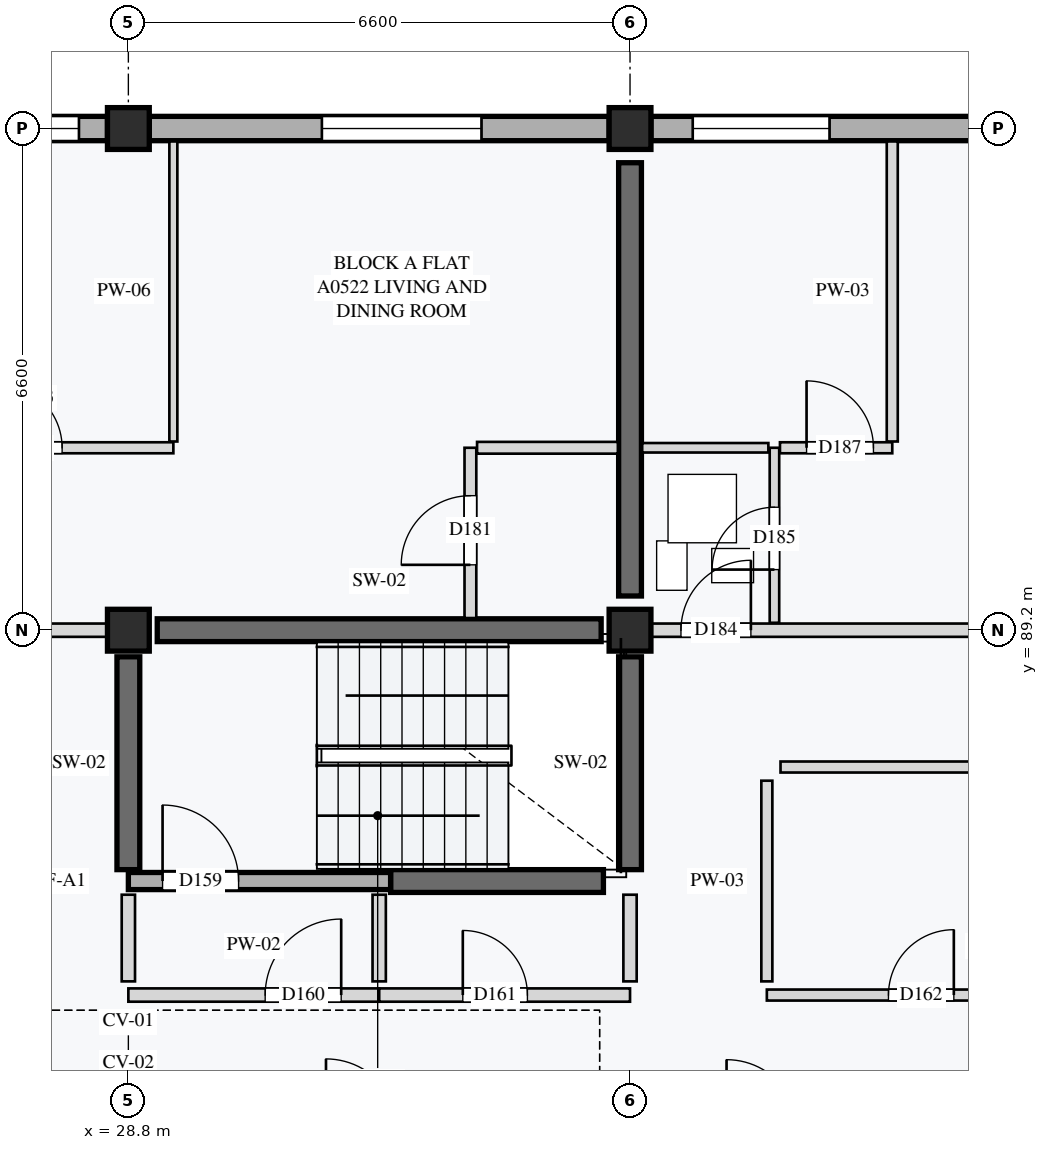
"""IFC4 building model, lengths in metres.
Left out: names, types, materials, properties, quantities, classifications, styles, units other than length and angle.
Written with IfcOpenShell. Run it as: python <this file> out.ifc"""

import sys

from ifc_helpers import new_model, si_unit, direction, frame, frame_2d, origin, origin_2d, place, context, subcontext, project, spatial, rectangle, extrude, element, fill, save


model = new_model("IFC4")
c1 = context("Model", 3, precision=1e-05, world=origin(), true_north=direction((0.0, 1.0)))
c2 = subcontext(c1, "Body", "Model", "MODEL_VIEW")
j1 = project(units=[si_unit("LENGTHUNIT", "METRE"), si_unit("PLANEANGLEUNIT", "RADIAN")], contexts=[c1])
p1 = place(None, origin())
s1 = spatial("IfcSite", under=j1, at=p1, CompositionType="ELEMENT")
p2 = place(p1, origin())
s2 = spatial("IfcBuilding", under=s1, at=p2, CompositionType="ELEMENT")
p3 = place(p2, frame((0.0, 0.0, 18.0)))
s3 = spatial("IfcBuildingStorey", under=s2, at=p3, CompositionType="ELEMENT", Elevation=18.0)
for number, where, z_axis, x_axis in (
    (1, (28.8, 89.2, 0.0), (0.0, 0.0, 1.0), (1.0, 0.0, 0.0)),
    (2, (28.8, 95.8, 0.0), (0.0, 0.0, 1.0), (1.0, 0.0, 0.0)),
    (3, (35.4, 89.2, 0.0), (0.0, 0.0, 1.0), (1.0, 0.0, 0.0)),
    (4, (35.4, 95.8, 0.0), (0.0, 0.0, 1.0), (1.0, 0.0, 0.0)),
):
    element("IfcColumn", number, at=place(p3, frame(where, z_axis=z_axis, x_axis=x_axis)), inside=s3, PredefinedType="COLUMN", context=c2, shape_type="SweptSolid", body=[
        extrude(rectangle(XDim=0.55, YDim=0.55, at=origin_2d()), origin(), (0.0, 0.0, 1.0), 3.2),
    ])
p4 = place(p3, frame((29.18, 89.2, 0.0), z_axis=(0.0, 0.0, 1.0), x_axis=(1.0, 0.0, 0.0)))
e5 = element("IfcWall", 5, at=p4, inside=s3, PredefinedType="SHEAR", context=c2, shape_type="SweptSolid", body=[
    extrude(rectangle(XDim=5.84, YDim=0.3, at=frame_2d((2.92, 0.0))), origin(), (0.0, 0.0, 1.0), 2.96),
])
for number, where, z_axis, x_axis in (
    (6, (32.25, 85.9, 0.0), (0.0, 0.0, 1.0), (1.0, 0.0, 0.0)),
    (7, (28.8, 86.05, 0.0), (0.0, 0.0, 1.0), (0.0, 1.0, 0.0)),
    (8, (35.4, 86.05, 0.0), (0.0, 0.0, 1.0), (0.0, 1.0, 0.0)),
):
    element("IfcWall", number, at=place(p3, frame(where, z_axis=z_axis, x_axis=x_axis)), inside=s3, PredefinedType="SHEAR", context=c2, shape_type="SweptSolid", body=[
        extrude(rectangle(XDim=2.8, YDim=0.3, at=frame_2d((1.4, 0.0))), origin(), (0.0, 0.0, 1.0), 2.96),
    ])
p5 = place(p3, frame((35.4, 89.65, 0.0), z_axis=(0.0, 0.0, 1.0), x_axis=(0.0, 1.0, 0.0)))
e9 = element("IfcWall", 9, at=p5, inside=s3, PredefinedType="SHEAR", context=c2, shape_type="SweptSolid", body=[
    extrude(rectangle(XDim=5.7, YDim=0.3, at=frame_2d((2.85, 0.0))), origin(), (0.0, 0.0, 1.0), 2.96),
])
p6 = place(p3, frame((22.475, 95.8, 0.0), z_axis=(0.0, 0.0, 1.0), x_axis=(1.0, 0.0, 0.0)))
e10 = element("IfcWall", 10, at=p6, inside=s3, PredefinedType="STANDARD", context=c2, shape_type="SweptSolid", body=[
    extrude(rectangle(XDim=6.05, YDim=0.32, at=frame_2d((3.025, 0.0))), origin(), (0.0, 0.0, 1.0), 2.65),
])
p7 = place(p6, frame((0.45, 0.0, 0.85)))
e11 = element("IfcOpeningElement", 11, at=p7, cuts=e10, PredefinedType="OPENING", context=c2, shape_type="SweptSolid", body=[
    extrude(rectangle(XDim=1.8, YDim=1.35, at=frame_2d((0.9, 0.675))), frame((0.0, 0.17, 0.0), z_axis=(0.0, -1.0, 0.0), x_axis=(1.0, 0.0, 0.0)), (0.0, 0.0, 1.0), 0.34),
])
p8 = place(p6, frame((3.875, 0.0, 0.85)))
e12 = element("IfcOpeningElement", 12, at=p8, cuts=e10, PredefinedType="OPENING", context=c2, shape_type="SweptSolid", body=[
    extrude(rectangle(XDim=1.8, YDim=1.35, at=frame_2d((0.9, 0.675))), frame((0.0, 0.17, 0.0), z_axis=(0.0, -1.0, 0.0), x_axis=(1.0, 0.0, 0.0)), (0.0, 0.0, 1.0), 0.34),
])
p9 = place(p3, frame((29.075, 95.8, 0.0), z_axis=(0.0, 0.0, 1.0), x_axis=(1.0, 0.0, 0.0)))
e13 = element("IfcWall", 13, at=p9, inside=s3, PredefinedType="STANDARD", context=c2, shape_type="SweptSolid", body=[
    extrude(rectangle(XDim=6.05, YDim=0.32, at=frame_2d((3.025, 0.0))), origin(), (0.0, 0.0, 1.0), 2.65),
])
p10 = place(p9, frame((2.271, 0.0, 0.85)))
e14 = element("IfcOpeningElement", 14, at=p10, cuts=e13, PredefinedType="OPENING", context=c2, shape_type="SweptSolid", body=[
    extrude(rectangle(XDim=2.1, YDim=1.55, at=frame_2d((1.05, 0.775))), frame((0.0, 0.17, 0.0), z_axis=(0.0, -1.0, 0.0), x_axis=(1.0, 0.0, 0.0)), (0.0, 0.0, 1.0), 0.34),
])
p11 = place(p3, frame((35.675, 95.8, 0.0), z_axis=(0.0, 0.0, 1.0), x_axis=(1.0, 0.0, 0.0)))
e15 = element("IfcWall", 15, at=p11, inside=s3, PredefinedType="STANDARD", context=c2, shape_type="SweptSolid", body=[
    extrude(rectangle(XDim=6.05, YDim=0.32, at=frame_2d((3.025, 0.0))), origin(), (0.0, 0.0, 1.0), 2.65),
])
p12 = place(p11, frame((0.55, 0.0, 0.85)))
e16 = element("IfcOpeningElement", 16, at=p12, cuts=e15, PredefinedType="OPENING", context=c2, shape_type="SweptSolid", body=[
    extrude(rectangle(XDim=1.8, YDim=1.35, at=frame_2d((0.9, 0.675))), frame((0.0, 0.17, 0.0), z_axis=(0.0, -1.0, 0.0), x_axis=(1.0, 0.0, 0.0)), (0.0, 0.0, 1.0), 0.34),
])
p13 = place(p3, frame((28.8, 85.9, 0.0), z_axis=(0.0, 0.0, 1.0), x_axis=(1.0, 0.0, 0.0)))
e17 = element("IfcWall", 17, at=p13, inside=s3, PredefinedType="STANDARD", context=c2, shape_type="SweptSolid", body=[
    extrude(rectangle(XDim=3.45, YDim=0.225, at=frame_2d((1.725, 0.0))), origin(), (0.0, 0.0, 1.0), 2.96),
])
p14 = place(p13, frame((0.45, 0.0, 0.0)))
e18 = element("IfcOpeningElement", 18, at=p14, cuts=e17, PredefinedType="OPENING", context=c2, shape_type="SweptSolid", body=[
    extrude(rectangle(XDim=1.0, YDim=2.1, at=frame_2d((0.5, 1.05))), frame((0.0, 0.123, 0.0), z_axis=(0.0, -1.0, 0.0), x_axis=(1.0, 0.0, 0.0)), (0.0, 0.0, 1.0), 0.245),
])
p15 = place(p3, frame((28.8, 84.4, 0.0), z_axis=(0.0, 0.0, 1.0), x_axis=(1.0, 0.0, 0.0)))
e19 = element("IfcWall", 19, at=p15, inside=s3, PredefinedType="PARTITIONING", context=c2, shape_type="SweptSolid", body=[
    extrude(rectangle(XDim=3.3, YDim=0.175, at=frame_2d((1.65, 0.0))), origin(), (0.0, 0.0, 1.0), 2.96),
])
p16 = place(p15, frame((1.8, 0.0, 0.0)))
e20 = element("IfcOpeningElement", 20, at=p16, cuts=e19, PredefinedType="OPENING", context=c2, shape_type="SweptSolid", body=[
    extrude(rectangle(XDim=1.0, YDim=2.16, at=frame_2d((0.5, 1.08))), frame((0.0, 0.097, 0.0), z_axis=(0.0, -1.0, 0.0), x_axis=(1.0, 0.0, 0.0)), (0.0, 0.0, 1.0), 0.195),
])
p17 = place(p3, frame((32.1, 84.4, 0.0), z_axis=(0.0, 0.0, 1.0), x_axis=(1.0, 0.0, 0.0)))
e21 = element("IfcWall", 21, at=p17, inside=s3, PredefinedType="PARTITIONING", context=c2, shape_type="SweptSolid", body=[
    extrude(rectangle(XDim=3.3, YDim=0.175, at=frame_2d((1.65, 0.0))), origin(), (0.0, 0.0, 1.0), 2.96),
])
p18 = place(p17, frame((1.1, 0.0, 0.0)))
e22 = element("IfcOpeningElement", 22, at=p18, cuts=e21, PredefinedType="OPENING", context=c2, shape_type="SweptSolid", body=[
    extrude(rectangle(XDim=0.85, YDim=2.0, at=frame_2d((0.425, 1.0))), frame((0.0, 0.097, 0.0), z_axis=(0.0, -1.0, 0.0), x_axis=(1.0, 0.0, 0.0)), (0.0, 0.0, 1.0), 0.195),
])
for number, where, z_axis, x_axis in (
    (23, (28.8, 84.58, 0.0), (0.0, 0.0, 1.0), (0.0, 1.0, 0.0)),
    (24, (32.1, 84.58, 0.0), (0.0, 0.0, 1.0), (0.0, 1.0, 0.0)),
    (25, (35.4, 84.58, 0.0), (0.0, 0.0, 1.0), (0.0, 1.0, 0.0)),
):
    element("IfcWall", number, at=place(p3, frame(where, z_axis=z_axis, x_axis=x_axis)), inside=s3, PredefinedType="PARTITIONING", context=c2, shape_type="SweptSolid", body=[
        extrude(rectangle(XDim=1.14, YDim=0.175, at=frame_2d((0.57, 0.0))), origin(), (0.0, 0.0, 1.0), 2.96),
    ])
p19 = place(p3, frame((37.2, 84.4, 0.0), z_axis=(0.0, 0.0, 1.0), x_axis=(1.0, 0.0, 0.0)))
e26 = element("IfcWall", 26, at=p19, inside=s3, PredefinedType="PARTITIONING", context=c2, shape_type="SweptSolid", body=[
    extrude(rectangle(XDim=6.0, YDim=0.145, at=frame_2d((3.0, 0.0))), origin(), (0.0, 0.0, 1.0), 2.96),
])
p20 = place(p19, frame((1.6, 0.0, 0.0)))
e27 = element("IfcOpeningElement", 27, at=p20, cuts=e26, PredefinedType="OPENING", context=c2, shape_type="SweptSolid", body=[
    extrude(rectangle(XDim=0.86, YDim=2.12, at=frame_2d((0.43, 1.06))), frame((0.0, 0.083, 0.0), z_axis=(0.0, -1.0, 0.0), x_axis=(1.0, 0.0, 0.0)), (0.0, 0.0, 1.0), 0.165),
])
p21 = place(p3, frame((37.38, 87.4, 0.0), z_axis=(0.0, 0.0, 1.0), x_axis=(1.0, 0.0, 0.0)))
e28 = element("IfcWall", 28, at=p21, inside=s3, PredefinedType="PARTITIONING", context=c2, shape_type="SweptSolid", body=[
    extrude(rectangle(XDim=11.2, YDim=0.145, at=frame_2d((5.6, 0.0))), origin(), (0.0, 0.0, 1.0), 2.96),
])
p22 = place(p3, frame((37.2, 84.58, 0.0), z_axis=(0.0, 0.0, 1.0), x_axis=(0.0, 1.0, 0.0)))
e29 = element("IfcWall", 29, at=p22, inside=s3, PredefinedType="PARTITIONING", context=c2, shape_type="SweptSolid", body=[
    extrude(rectangle(XDim=2.64, YDim=0.145, at=frame_2d((1.32, 0.0))), origin(), (0.0, 0.0, 1.0), 2.96),
])
p23 = place(p3, frame((22.2, 89.2, 0.0), z_axis=(0.0, 0.0, 1.0), x_axis=(1.0, 0.0, 0.0)))
e30 = element("IfcWall", 30, at=p23, inside=s3, PredefinedType="PARTITIONING", context=c2, shape_type="SweptSolid", body=[
    extrude(rectangle(XDim=6.6, YDim=0.175, at=frame_2d((3.3, 0.0))), origin(), (0.0, 0.0, 1.0), 2.55),
])
p24 = place(p23, frame((3.85, 0.0, 0.0)))
e31 = element("IfcOpeningElement", 31, at=p24, cuts=e30, PredefinedType="OPENING", context=c2, shape_type="SweptSolid", body=[
    extrude(rectangle(XDim=0.95, YDim=2.16, at=frame_2d((0.475, 1.08))), frame((0.0, 0.097, 0.0), z_axis=(0.0, -1.0, 0.0), x_axis=(1.0, 0.0, 0.0)), (0.0, 0.0, 1.0), 0.195),
])
p25 = place(p3, frame((33.3, 89.36, 0.0), z_axis=(0.0, 0.0, 1.0), x_axis=(0.0, 1.0, 0.0)))
e32 = element("IfcWall", 32, at=p25, inside=s3, PredefinedType="PARTITIONING", context=c2, shape_type="SweptSolid", body=[
    extrude(rectangle(XDim=2.24, YDim=0.155, at=frame_2d((1.12, 0.0))), origin(), (0.0, 0.0, 1.0), 2.96),
])
p26 = place(p25, frame((0.7, 0.0, 0.0)))
e33 = element("IfcOpeningElement", 33, at=p26, cuts=e32, PredefinedType="OPENING", context=c2, shape_type="SweptSolid", body=[
    extrude(rectangle(XDim=0.91, YDim=2.14, at=frame_2d((0.455, 1.07))), frame((0.0, 0.087, 0.0), z_axis=(0.0, -1.0, 0.0), x_axis=(1.0, 0.0, 0.0)), (0.0, 0.0, 1.0), 0.175),
])
p27 = place(p3, frame((33.387, 91.6, 0.0), z_axis=(0.0, 0.0, 1.0), x_axis=(1.0, 0.0, 0.0)))
e34 = element("IfcWall", 34, at=p27, inside=s3, PredefinedType="PARTITIONING", context=c2, shape_type="SweptSolid", body=[
    extrude(rectangle(XDim=1.853, YDim=0.155, at=frame_2d((0.926, 0.0))), origin(), (0.0, 0.0, 1.0), 2.96),
])
p28 = place(p3, frame((25.532, 91.6, 0.0), z_axis=(0.0, 0.0, 1.0), x_axis=(1.0, 0.0, 0.0)))
e35 = element("IfcWall", 35, at=p28, inside=s3, PredefinedType="PARTITIONING", context=c2, shape_type="SweptSolid", body=[
    extrude(rectangle(XDim=3.86, YDim=0.145, at=frame_2d((1.93, 0.0))), origin(), (0.0, 0.0, 1.0), 2.96),
])
p29 = place(p28, frame((1.546, 0.0, 0.0)))
e36 = element("IfcOpeningElement", 36, at=p29, cuts=e35, PredefinedType="OPENING", context=c2, shape_type="SweptSolid", body=[
    extrude(rectangle(XDim=0.85, YDim=2.1, at=frame_2d((0.425, 1.05))), frame((0.0, 0.083, 0.0), z_axis=(0.0, -1.0, 0.0), x_axis=(1.0, 0.0, 0.0)), (0.0, 0.0, 1.0), 0.165),
])
p30 = place(p3, frame((29.392, 91.683, 0.0), z_axis=(0.0, 0.0, 1.0), x_axis=(0.0, 1.0, 0.0)))
e37 = element("IfcWall", 37, at=p30, inside=s3, PredefinedType="PARTITIONING", context=c2, shape_type="SweptSolid", body=[
    extrude(rectangle(XDim=3.947, YDim=0.105, at=frame_2d((1.974, 0.0))), origin(), (0.0, 0.0, 1.0), 2.96),
])
p31 = place(p3, frame((35.4, 89.2, 0.0), z_axis=(0.0, 0.0, 1.0), x_axis=(1.0, 0.0, 0.0)))
e38 = element("IfcWall", 38, at=p31, inside=s3, PredefinedType="PARTITIONING", context=c2, shape_type="SweptSolid", body=[
    extrude(rectangle(XDim=13.2, YDim=0.175, at=frame_2d((6.6, 0.0))), origin(), (0.0, 0.0, 1.0), 2.55),
])
p32 = place(p31, frame((0.67, 0.0, 0.0)))
e39 = element("IfcOpeningElement", 39, at=p32, cuts=e38, PredefinedType="OPENING", context=c2, shape_type="SweptSolid", body=[
    extrude(rectangle(XDim=0.92, YDim=2.14, at=frame_2d((0.46, 1.07))), frame((0.0, 0.097, 0.0), z_axis=(0.0, -1.0, 0.0), x_axis=(1.0, 0.0, 0.0)), (0.0, 0.0, 1.0), 0.195),
])
p33 = place(p3, frame((37.3, 89.298, 0.0), z_axis=(0.0, 0.0, 1.0), x_axis=(0.0, 1.0, 0.0)))
e40 = element("IfcWall", 40, at=p33, inside=s3, PredefinedType="PARTITIONING", context=c2, shape_type="SweptSolid", body=[
    extrude(rectangle(XDim=2.302, YDim=0.125, at=frame_2d((1.151, 0.0))), origin(), (0.0, 0.0, 1.0), 2.96),
])
p34 = place(p33, frame((0.7, 0.0, 0.0)))
e41 = element("IfcOpeningElement", 41, at=p34, cuts=e40, PredefinedType="OPENING", context=c2, shape_type="SweptSolid", body=[
    extrude(rectangle(XDim=0.82, YDim=2.05, at=frame_2d((0.41, 1.025))), frame((0.0, 0.073, 0.0), z_axis=(0.0, -1.0, 0.0), x_axis=(1.0, 0.0, 0.0)), (0.0, 0.0, 1.0), 0.145),
])
p35 = place(p3, frame((35.56, 91.6, 0.0), z_axis=(0.0, 0.0, 1.0), x_axis=(1.0, 0.0, 0.0)))
e42 = element("IfcWall", 42, at=p35, inside=s3, PredefinedType="PARTITIONING", context=c2, shape_type="SweptSolid", body=[
    extrude(rectangle(XDim=1.66, YDim=0.125, at=frame_2d((0.83, 0.0))), origin(), (0.0, 0.0, 1.0), 2.96),
])
p36 = place(p3, frame((37.373, 91.6, 0.0), z_axis=(0.0, 0.0, 1.0), x_axis=(1.0, 0.0, 0.0)))
e43 = element("IfcWall", 43, at=p36, inside=s3, PredefinedType="PARTITIONING", context=c2, shape_type="SweptSolid", body=[
    extrude(rectangle(XDim=1.478, YDim=0.145, at=frame_2d((0.739, 0.0))), origin(), (0.0, 0.0, 1.0), 2.96),
])
p37 = place(p36, frame((0.35, 0.0, 0.0)))
e44 = element("IfcOpeningElement", 44, at=p37, cuts=e43, PredefinedType="OPENING", context=c2, shape_type="SweptSolid", body=[
    extrude(rectangle(XDim=0.88, YDim=2.1, at=frame_2d((0.44, 1.05))), frame((0.0, 0.083, 0.0), z_axis=(0.0, -1.0, 0.0), x_axis=(1.0, 0.0, 0.0)), (0.0, 0.0, 1.0), 0.165),
])
p38 = place(p3, frame((38.85, 91.683, 0.0), z_axis=(0.0, 0.0, 1.0), x_axis=(0.0, 1.0, 0.0)))
e45 = element("IfcWall", 45, at=p38, inside=s3, PredefinedType="PARTITIONING", context=c2, shape_type="SweptSolid", body=[
    extrude(rectangle(XDim=3.947, YDim=0.145, at=frame_2d((1.974, 0.0))), origin(), (0.0, 0.0, 1.0), 2.96),
])
p39 = place(p8, origin())
e46 = element("IfcWindow", 46, at=p39, inside=s3, PartitioningType="SINGLE_PANEL", PredefinedType="WINDOW", context=c2, shape_type="SweptSolid", body=[
    extrude(rectangle(XDim=1.8, YDim=1.35, at=frame_2d((0.9, 0.675))), frame((0.0, 0.03, 0.0), z_axis=(0.0, -1.0, 0.0), x_axis=(1.0, 0.0, 0.0)), (0.0, 0.0, 1.0), 0.06),
])
fill(e12, e46)
p40 = place(p10, origin())
e47 = element("IfcWindow", 47, at=p40, inside=s3, PartitioningType="SINGLE_PANEL", PredefinedType="WINDOW", context=c2, shape_type="SweptSolid", body=[
    extrude(rectangle(XDim=2.1, YDim=1.55, at=frame_2d((1.05, 0.775))), frame((0.0, 0.03, 0.0), z_axis=(0.0, -1.0, 0.0), x_axis=(1.0, 0.0, 0.0)), (0.0, 0.0, 1.0), 0.06),
])
fill(e14, e47)
p41 = place(p12, origin())
e48 = element("IfcWindow", 48, at=p41, inside=s3, PartitioningType="SINGLE_PANEL", PredefinedType="WINDOW", context=c2, shape_type="SweptSolid", body=[
    extrude(rectangle(XDim=1.8, YDim=1.35, at=frame_2d((0.9, 0.675))), frame((0.0, 0.03, 0.0), z_axis=(0.0, -1.0, 0.0), x_axis=(1.0, 0.0, 0.0)), (0.0, 0.0, 1.0), 0.06),
])
fill(e16, e48)
p42 = place(p14, origin())
e49 = element("IfcDoor", 49, at=p42, inside=s3, OperationType="SINGLE_SWING_LEFT", PredefinedType="DOOR", context=c2, shape_type="SweptSolid", body=[
    extrude(rectangle(XDim=1.0, YDim=2.1, at=frame_2d((0.5, 1.05))), frame((0.0, 0.025, 0.0), z_axis=(0.0, -1.0, 0.0), x_axis=(1.0, 0.0, 0.0)), (0.0, 0.0, 1.0), 0.05),
])
fill(e18, e49)
p43 = place(p16, origin())
e50 = element("IfcDoor", 50, at=p43, inside=s3, OperationType="SINGLE_SWING_RIGHT", PredefinedType="DOOR", context=c2, shape_type="SweptSolid", body=[
    extrude(rectangle(XDim=1.0, YDim=2.16, at=frame_2d((0.5, 1.08))), frame((0.0, 0.025, 0.0), z_axis=(0.0, -1.0, 0.0), x_axis=(1.0, 0.0, 0.0)), (0.0, 0.0, 1.0), 0.05),
])
fill(e20, e50)
p44 = place(p18, origin())
e51 = element("IfcDoor", 51, at=p44, inside=s3, OperationType="SINGLE_SWING_LEFT", PredefinedType="DOOR", context=c2, shape_type="SweptSolid", body=[
    extrude(rectangle(XDim=0.85, YDim=2.0, at=frame_2d((0.425, 1.0))), frame((0.0, 0.025, 0.0), z_axis=(0.0, -1.0, 0.0), x_axis=(1.0, 0.0, 0.0)), (0.0, 0.0, 1.0), 0.05),
])
fill(e22, e51)
p45 = place(p20, origin())
e52 = element("IfcDoor", 52, at=p45, inside=s3, OperationType="SINGLE_SWING_RIGHT", PredefinedType="DOOR", context=c2, shape_type="SweptSolid", body=[
    extrude(rectangle(XDim=0.86, YDim=2.12, at=frame_2d((0.43, 1.06))), frame((0.0, 0.025, 0.0), z_axis=(0.0, -1.0, 0.0), x_axis=(1.0, 0.0, 0.0)), (0.0, 0.0, 1.0), 0.05),
])
fill(e27, e52)
p46 = place(p26, origin())
e53 = element("IfcDoor", 53, at=p46, inside=s3, OperationType="SINGLE_SWING_LEFT", PredefinedType="DOOR", context=c2, shape_type="SweptSolid", body=[
    extrude(rectangle(XDim=0.91, YDim=2.14, at=frame_2d((0.455, 1.07))), frame((0.0, 0.025, 0.0), z_axis=(0.0, -1.0, 0.0), x_axis=(1.0, 0.0, 0.0)), (0.0, 0.0, 1.0), 0.05),
])
fill(e33, e53)
p47 = place(p29, origin())
e54 = element("IfcDoor", 54, at=p47, inside=s3, OperationType="SINGLE_SWING_LEFT", PredefinedType="DOOR", context=c2, shape_type="SweptSolid", body=[
    extrude(rectangle(XDim=0.85, YDim=2.1, at=frame_2d((0.425, 1.05))), frame((0.0, 0.025, 0.0), z_axis=(0.0, -1.0, 0.0), x_axis=(1.0, 0.0, 0.0)), (0.0, 0.0, 1.0), 0.05),
])
fill(e36, e54)
p48 = place(p32, origin())
e55 = element("IfcDoor", 55, at=p48, inside=s3, OperationType="SINGLE_SWING_RIGHT", PredefinedType="DOOR", context=c2, shape_type="SweptSolid", body=[
    extrude(rectangle(XDim=0.92, YDim=2.14, at=frame_2d((0.46, 1.07))), frame((0.0, 0.025, 0.0), z_axis=(0.0, -1.0, 0.0), x_axis=(1.0, 0.0, 0.0)), (0.0, 0.0, 1.0), 0.05),
])
fill(e39, e55)
p49 = place(p34, origin())
e56 = element("IfcDoor", 56, at=p49, inside=s3, OperationType="SINGLE_SWING_LEFT", PredefinedType="DOOR", context=c2, shape_type="SweptSolid", body=[
    extrude(rectangle(XDim=0.82, YDim=2.05, at=frame_2d((0.41, 1.025))), frame((0.0, 0.025, 0.0), z_axis=(0.0, -1.0, 0.0), x_axis=(1.0, 0.0, 0.0)), (0.0, 0.0, 1.0), 0.05),
])
fill(e41, e56)
p50 = place(p37, origin())
e57 = element("IfcDoor", 57, at=p50, inside=s3, OperationType="SINGLE_SWING_LEFT", PredefinedType="DOOR", context=c2, shape_type="SweptSolid", body=[
    extrude(rectangle(XDim=0.88, YDim=2.1, at=frame_2d((0.44, 1.05))), frame((0.0, 0.025, 0.0), z_axis=(0.0, -1.0, 0.0), x_axis=(1.0, 0.0, 0.0)), (0.0, 0.0, 1.0), 0.05),
])
fill(e44, e57)
save(model, sys.argv[1])
